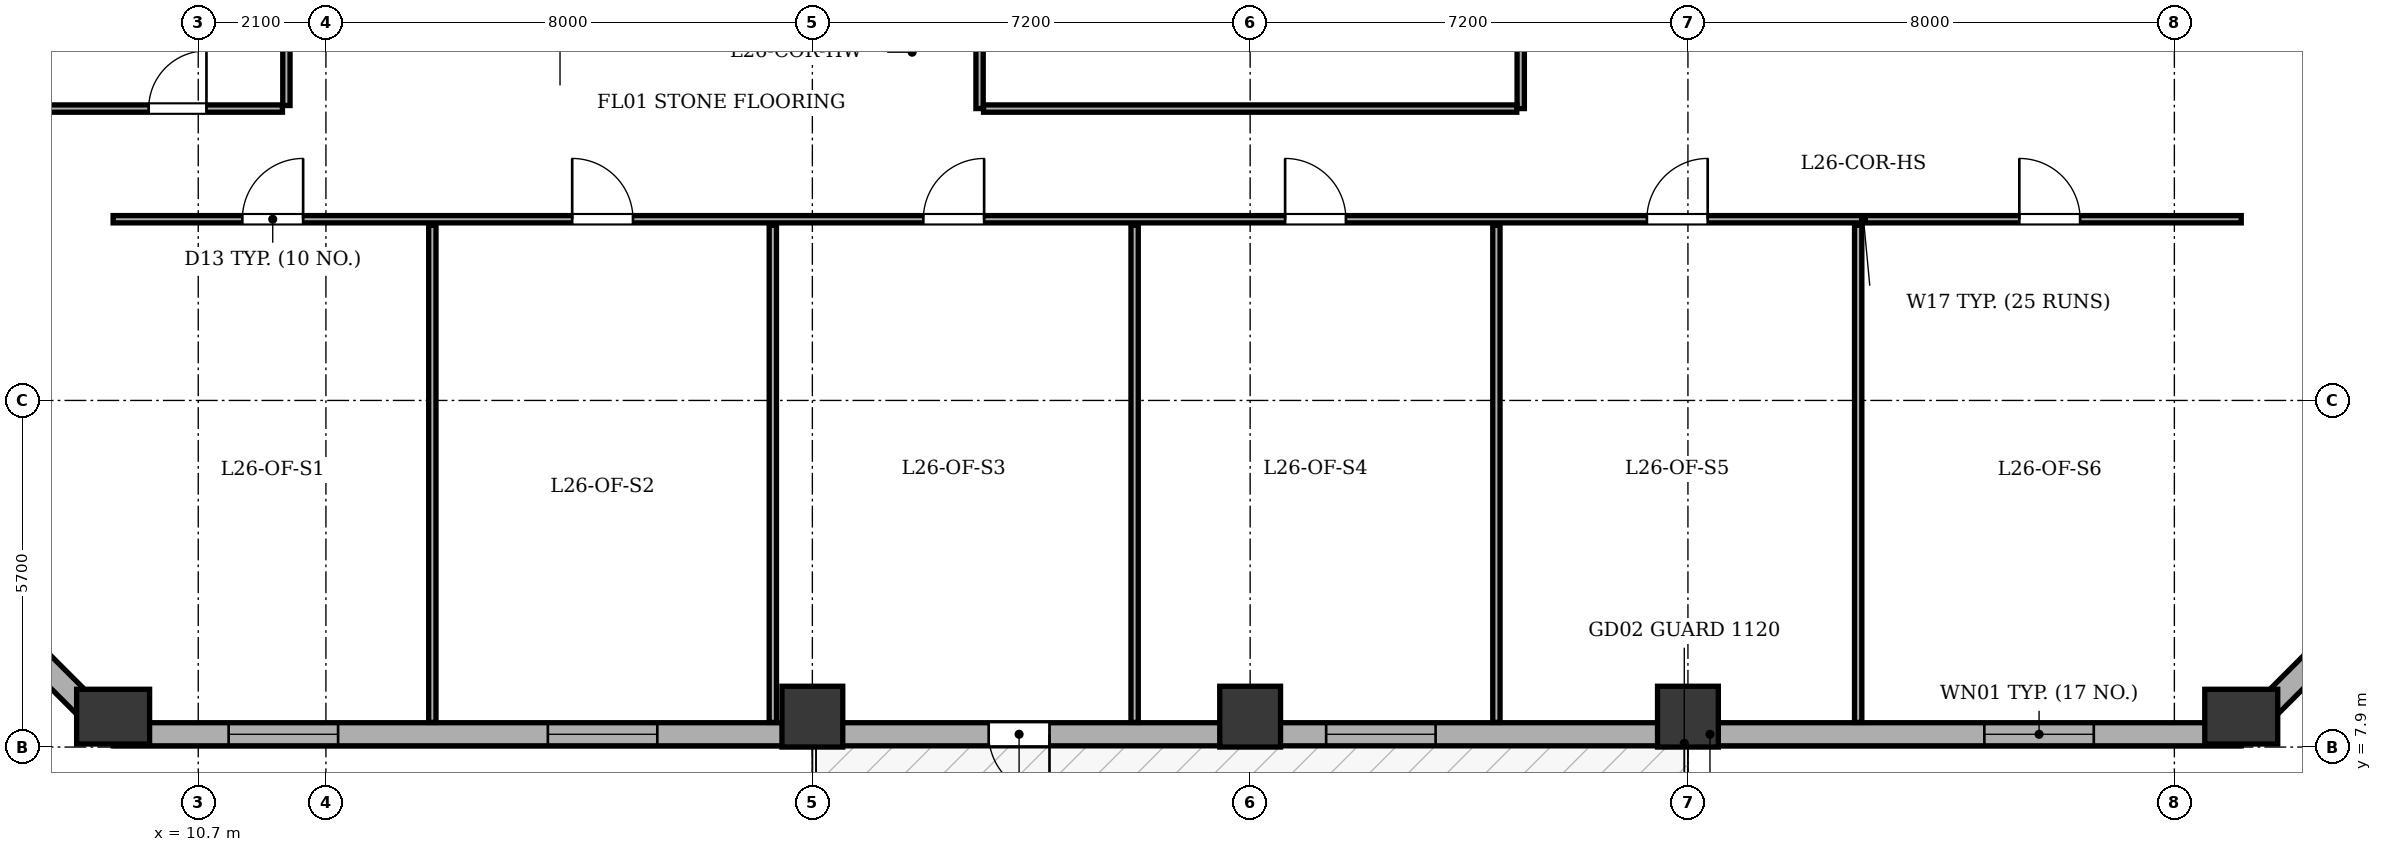
"""IFC4 building model, lengths in metres.
Left out: names, types, materials, properties, quantities, classifications, styles, units other than length and angle.
Written with IfcOpenShell. Run it as: python <this file> out.ifc"""

import sys

from ifc_helpers import new_model, si_unit, direction, frame, frame_2d, origin, origin_2d, place, context, subcontext, project, spatial, rectangle, extrude, element, fill, save


model = new_model("IFC4")
c1 = context("Model", 3, precision=1e-05, world=origin(), true_north=direction((0.0, 1.0)))
c2 = subcontext(c1, "Body", "Model", "MODEL_VIEW")
j1 = project(units=[si_unit("LENGTHUNIT", "METRE"), si_unit("PLANEANGLEUNIT", "RADIAN")], contexts=[c1])
p1 = place(None, origin())
s1 = spatial("IfcSite", under=j1, at=p1, CompositionType="ELEMENT")
p2 = place(p1, origin())
s2 = spatial("IfcBuilding", under=s1, at=p2, CompositionType="ELEMENT")
p3 = place(p2, frame((0.0, 0.0, 106.2)))
s3 = spatial("IfcBuildingStorey", under=s2, at=p3, CompositionType="ELEMENT", Elevation=106.2)
p4 = place(p3, frame((9.3, 8.4, 0.0), z_axis=(0.0, 0.0, 1.0), x_axis=(1.0, 0.0, 0.0)))
e1 = element("IfcColumn", 1, at=p4, inside=s3, PredefinedType="COLUMN", context=c2, shape_type="SweptSolid", body=[
    extrude(rectangle(XDim=0.9, YDim=1.2, at=origin_2d()), origin(), (0.0, 0.0, 1.0), 3.9),
])
for number, where, z_axis, x_axis in (
    (2, (20.8, 8.4, 0.0), (0.0, 0.0, 1.0), (1.0, 0.0, 0.0)),
    (3, (28.0, 8.4, 0.0), (0.0, 0.0, 1.0), (1.0, 0.0, 0.0)),
    (4, (35.2, 8.4, 0.0), (0.0, 0.0, 1.0), (1.0, 0.0, 0.0)),
):
    element("IfcColumn", number, at=place(p3, frame(where, z_axis=z_axis, x_axis=x_axis)), inside=s3, PredefinedType="COLUMN", context=c2, shape_type="SweptSolid", body=[
        extrude(rectangle(XDim=1.0, YDim=1.0, at=origin_2d()), origin(), (0.0, 0.0, 1.0), 3.9),
    ])
p5 = place(p3, frame((44.3, 8.4, 0.0), z_axis=(0.0, 0.0, 1.0), x_axis=(1.0, 0.0, 0.0)))
e5 = element("IfcColumn", 5, at=p5, inside=s3, PredefinedType="COLUMN", context=c2, shape_type="SweptSolid", body=[
    extrude(rectangle(XDim=0.9, YDim=1.2, at=origin_2d()), origin(), (0.0, 0.0, 1.0), 3.9),
])
p6 = place(p3, frame((44.3, 8.11, 0.0), z_axis=(0.0, 0.0, 1.0), x_axis=(-1.0, 0.0, 0.0)))
e6 = element("IfcWall", 6, at=p6, inside=s3, PredefinedType="STANDARD", context=c2, shape_type="SweptSolid", body=[
    extrude(rectangle(XDim=35.0, YDim=0.38, at=frame_2d((17.5, 0.0))), origin(), (0.0, 0.0, 1.0), 2.985),
])
p7 = place(p6, frame((19.6, 0.0, 0.0)))
e7 = element("IfcOpeningElement", 7, at=p7, cuts=e6, PredefinedType="OPENING", context=c2, shape_type="SweptSolid", body=[
    extrude(rectangle(XDim=1.0, YDim=2.02, at=frame_2d((0.5, 1.01))), frame((0.0, 0.2, 0.0), z_axis=(0.0, -1.0, 0.0), x_axis=(1.0, 0.0, 0.0)), (0.0, 0.0, 1.0), 0.4),
])
p8 = place(p6, frame((2.425, 0.0, 0.8)))
e8 = element("IfcOpeningElement", 8, at=p8, cuts=e6, PredefinedType="OPENING", context=c2, shape_type="SweptSolid", body=[
    extrude(rectangle(XDim=1.8, YDim=1.9, at=frame_2d((0.9, 0.95))), frame((0.0, 0.2, 0.0), z_axis=(0.0, -1.0, 0.0), x_axis=(1.0, 0.0, 0.0)), (0.0, 0.0, 1.0), 0.4),
])
p9 = place(p6, frame((13.25, 0.0, 0.8)))
e9 = element("IfcOpeningElement", 9, at=p9, cuts=e6, PredefinedType="OPENING", context=c2, shape_type="SweptSolid", body=[
    extrude(rectangle(XDim=1.8, YDim=1.9, at=frame_2d((0.9, 0.95))), frame((0.0, 0.2, 0.0), z_axis=(0.0, -1.0, 0.0), x_axis=(1.0, 0.0, 0.0)), (0.0, 0.0, 1.0), 0.4),
])
p10 = place(p6, frame((26.05, 0.0, 0.8)))
e10 = element("IfcOpeningElement", 10, at=p10, cuts=e6, PredefinedType="OPENING", context=c2, shape_type="SweptSolid", body=[
    extrude(rectangle(XDim=1.8, YDim=1.9, at=frame_2d((0.9, 0.95))), frame((0.0, 0.2, 0.0), z_axis=(0.0, -1.0, 0.0), x_axis=(1.0, 0.0, 0.0)), (0.0, 0.0, 1.0), 0.4),
])
p11 = place(p6, frame((31.3, 0.0, 0.8)))
e11 = element("IfcOpeningElement", 11, at=p11, cuts=e6, PredefinedType="OPENING", context=c2, shape_type="SweptSolid", body=[
    extrude(rectangle(XDim=1.8, YDim=1.9, at=frame_2d((0.9, 0.95))), frame((0.0, 0.2, 0.0), z_axis=(0.0, -1.0, 0.0), x_axis=(1.0, 0.0, 0.0)), (0.0, 0.0, 1.0), 0.4),
])
p12 = place(p3, frame((9.3, 8.11, 0.0), z_axis=(0.0, 0.0, 1.0), x_axis=(-0.707124801467, 0.707088760447, 0.0)))
e12 = element("IfcWall", 12, at=p12, inside=s3, PredefinedType="STANDARD", context=c2, shape_type="SweptSolid", body=[
    extrude(rectangle(XDim=6.774, YDim=0.38, at=frame_2d((3.387, 0.0))), origin(), (0.0, 0.0, 1.0), 2.985),
])
p13 = place(p12, frame((2.687, 0.0, 0.8)))
e13 = element("IfcOpeningElement", 13, at=p13, cuts=e12, PredefinedType="OPENING", context=c2, shape_type="SweptSolid", body=[
    extrude(rectangle(XDim=1.4, YDim=1.65, at=frame_2d((0.7, 0.825))), frame((0.0, 0.2, 0.0), z_axis=(0.0, -1.0, 0.0), x_axis=(1.0, 0.0, 0.0)), (0.0, 0.0, 1.0), 0.4),
])
p14 = place(p3, frame((49.09, 12.9, 0.0), z_axis=(0.0, 0.0, 1.0), x_axis=(-0.707124801467, -0.707088760447, 0.0)))
e14 = element("IfcWall", 14, at=p14, inside=s3, PredefinedType="STANDARD", context=c2, shape_type="SweptSolid", body=[
    extrude(rectangle(XDim=6.774, YDim=0.38, at=frame_2d((3.387, 0.0))), origin(), (0.0, 0.0, 1.0), 2.985),
])
p15 = place(p14, frame((2.687, 0.0, 0.8)))
e15 = element("IfcOpeningElement", 15, at=p15, cuts=e14, PredefinedType="OPENING", context=c2, shape_type="SweptSolid", body=[
    extrude(rectangle(XDim=1.4, YDim=1.65, at=frame_2d((0.7, 0.825))), frame((0.0, 0.2, 0.0), z_axis=(0.0, -1.0, 0.0), x_axis=(1.0, 0.0, 0.0)), (0.0, 0.0, 1.0), 0.4),
])
for number, where, z_axis, x_axis in (
    (16, (23.55, 18.4, 0.0), (0.0, 0.0, 1.0), (0.0, 1.0, 0.0)),
    (17, (32.45, 18.4, 0.0), (0.0, 0.0, 1.0), (0.0, 1.0, 0.0)),
):
    element("IfcWall", number, at=place(p3, frame(where, z_axis=z_axis, x_axis=x_axis)), inside=s3, PredefinedType="PARTITIONING", context=c2, shape_type="SweptSolid", body=[
        extrude(rectangle(XDim=3.485, YDim=0.12, at=frame_2d((1.743, 0.0))), origin(), (0.0, 0.0, 1.0), 3.45),
    ])
p16 = place(p3, frame((23.615, 18.4, 0.0), z_axis=(0.0, 0.0, 1.0), x_axis=(1.0, 0.0, 0.0)))
e18 = element("IfcWall", 18, at=p16, inside=s3, PredefinedType="PARTITIONING", context=c2, shape_type="SweptSolid", body=[
    extrude(rectangle(XDim=8.77, YDim=0.12, at=frame_2d((4.385, 0.0))), origin(), (0.0, 0.0, 1.0), 3.45),
])
p17 = place(p3, frame((9.3, 16.58, 0.0), z_axis=(0.0, 0.0, 1.0), x_axis=(1.0, 0.0, 0.0)))
e19 = element("IfcWall", 19, at=p17, inside=s3, PredefinedType="PARTITIONING", context=c2, shape_type="SweptSolid", body=[
    extrude(rectangle(XDim=35.0, YDim=0.12, at=frame_2d((17.5, 0.0))), origin(), (0.0, 0.0, 1.0), 3.45),
])
p18 = place(p17, frame((2.125, 0.0, 0.0)))
e20 = element("IfcOpeningElement", 20, at=p18, cuts=e19, PredefinedType="OPENING", context=c2, shape_type="SweptSolid", body=[
    extrude(rectangle(XDim=1.0, YDim=2.1, at=frame_2d((0.5, 1.05))), frame((0.0, 0.07, 0.0), z_axis=(0.0, -1.0, 0.0), x_axis=(1.0, 0.0, 0.0)), (0.0, 0.0, 1.0), 0.14),
])
p19 = place(p17, frame((7.55, 0.0, 0.0)))
e21 = element("IfcOpeningElement", 21, at=p19, cuts=e19, PredefinedType="OPENING", context=c2, shape_type="SweptSolid", body=[
    extrude(rectangle(XDim=1.0, YDim=2.1, at=frame_2d((0.5, 1.05))), frame((0.0, 0.07, 0.0), z_axis=(0.0, -1.0, 0.0), x_axis=(1.0, 0.0, 0.0)), (0.0, 0.0, 1.0), 0.14),
])
p20 = place(p17, frame((13.325, 0.0, 0.0)))
e22 = element("IfcOpeningElement", 22, at=p20, cuts=e19, PredefinedType="OPENING", context=c2, shape_type="SweptSolid", body=[
    extrude(rectangle(XDim=1.0, YDim=2.1, at=frame_2d((0.5, 1.05))), frame((0.0, 0.07, 0.0), z_axis=(0.0, -1.0, 0.0), x_axis=(1.0, 0.0, 0.0)), (0.0, 0.0, 1.0), 0.14),
])
p21 = place(p17, frame((19.275, 0.0, 0.0)))
e23 = element("IfcOpeningElement", 23, at=p21, cuts=e19, PredefinedType="OPENING", context=c2, shape_type="SweptSolid", body=[
    extrude(rectangle(XDim=1.0, YDim=2.1, at=frame_2d((0.5, 1.05))), frame((0.0, 0.07, 0.0), z_axis=(0.0, -1.0, 0.0), x_axis=(1.0, 0.0, 0.0)), (0.0, 0.0, 1.0), 0.14),
])
p22 = place(p17, frame((25.225, 0.0, 0.0)))
e24 = element("IfcOpeningElement", 24, at=p22, cuts=e19, PredefinedType="OPENING", context=c2, shape_type="SweptSolid", body=[
    extrude(rectangle(XDim=1.0, YDim=2.1, at=frame_2d((0.5, 1.05))), frame((0.0, 0.07, 0.0), z_axis=(0.0, -1.0, 0.0), x_axis=(1.0, 0.0, 0.0)), (0.0, 0.0, 1.0), 0.14),
])
p23 = place(p17, frame((31.35, 0.0, 0.0)))
e25 = element("IfcOpeningElement", 25, at=p23, cuts=e19, PredefinedType="OPENING", context=c2, shape_type="SweptSolid", body=[
    extrude(rectangle(XDim=1.0, YDim=2.1, at=frame_2d((0.5, 1.05))), frame((0.0, 0.07, 0.0), z_axis=(0.0, -1.0, 0.0), x_axis=(1.0, 0.0, 0.0)), (0.0, 0.0, 1.0), 0.14),
])
for number, where, z_axis, x_axis in (
    (26, (14.55, 8.305, 0.0), (0.0, 0.0, 1.0), (0.0, 1.0, 0.0)),
    (27, (20.15, 8.305, 0.0), (0.0, 0.0, 1.0), (0.0, 1.0, 0.0)),
):
    element("IfcWall", number, at=place(p3, frame(where, z_axis=z_axis, x_axis=x_axis)), inside=s3, PredefinedType="PARTITIONING", context=c2, shape_type="SweptSolid", body=[
        extrude(rectangle(XDim=8.175, YDim=0.12, at=frame_2d((4.087, 0.0))), origin(), (0.0, 0.0, 1.0), 3.45),
    ])
p24 = place(p3, frame((26.1, 8.305, 0.0), z_axis=(0.0, 0.0, 1.0), x_axis=(0.0, 1.0, 0.0)))
e28 = element("IfcWall", 28, at=p24, inside=s3, PredefinedType="PARTITIONING", context=c2, shape_type="SweptSolid", body=[
    extrude(rectangle(XDim=8.175, YDim=0.12, at=frame_2d((4.087, 0.0))), origin(), (0.0, 0.0, 1.0), 2.985),
])
for number, where, z_axis, x_axis in (
    (29, (32.05, 8.305, 0.0), (0.0, 0.0, 1.0), (0.0, 1.0, 0.0)),
    (30, (38.0, 8.305, 0.0), (0.0, 0.0, 1.0), (0.0, 1.0, 0.0)),
):
    element("IfcWall", number, at=place(p3, frame(where, z_axis=z_axis, x_axis=x_axis)), inside=s3, PredefinedType="PARTITIONING", context=c2, shape_type="SweptSolid", body=[
        extrude(rectangle(XDim=8.175, YDim=0.12, at=frame_2d((4.087, 0.0))), origin(), (0.0, 0.0, 1.0), 3.45),
    ])
p25 = place(p3, frame((12.15, 18.45, 0.0), z_axis=(0.0, 0.0, 1.0), x_axis=(0.0, 1.0, 0.0)))
e31 = element("IfcWall", 31, at=p25, inside=s3, PredefinedType="PARTITIONING", context=c2, shape_type="SweptSolid", body=[
    extrude(rectangle(XDim=17.5, YDim=0.12, at=frame_2d((8.75, 0.0))), origin(), (0.0, 0.0, 1.0), 3.45),
])
p26 = place(p3, frame((4.705, 18.4, 0.0), z_axis=(0.0, 0.0, 1.0), x_axis=(1.0, 0.0, 0.0)))
e32 = element("IfcWall", 32, at=p26, inside=s3, PredefinedType="PARTITIONING", context=c2, shape_type="SweptSolid", body=[
    extrude(rectangle(XDim=7.38, YDim=0.12, at=frame_2d((3.69, 0.0))), origin(), (0.0, 0.0, 1.0), 3.45),
])
p27 = place(p26, frame((5.18, 0.0, 0.0)))
e33 = element("IfcOpeningElement", 33, at=p27, cuts=e32, PredefinedType="OPENING", context=c2, shape_type="SweptSolid", body=[
    extrude(rectangle(XDim=0.95, YDim=2.1, at=frame_2d((0.475, 1.05))), frame((0.0, 0.07, 0.0), z_axis=(0.0, -1.0, 0.0), x_axis=(1.0, 0.0, 0.0)), (0.0, 0.0, 1.0), 0.14),
])
p28 = place(p7, origin())
e34 = element("IfcDoor", 34, at=p28, inside=s3, OperationType="SINGLE_SWING_LEFT", PredefinedType="DOOR", context=c2, shape_type="SweptSolid", body=[
    extrude(rectangle(XDim=1.0, YDim=2.02, at=frame_2d((0.5, 1.01))), frame((0.0, 0.025, 0.0), z_axis=(0.0, -1.0, 0.0), x_axis=(1.0, 0.0, 0.0)), (0.0, 0.0, 1.0), 0.05),
])
fill(e7, e34)
p29 = place(p8, origin())
e35 = element("IfcWindow", 35, at=p29, inside=s3, PartitioningType="SINGLE_PANEL", PredefinedType="WINDOW", context=c2, shape_type="SweptSolid", body=[
    extrude(rectangle(XDim=1.8, YDim=1.9, at=frame_2d((0.9, 0.95))), frame((0.0, -0.01, 0.0), z_axis=(0.0, -1.0, 0.0), x_axis=(1.0, 0.0, 0.0)), (0.0, 0.0, 1.0), 0.06),
])
fill(e8, e35)
p30 = place(p9, origin())
e36 = element("IfcWindow", 36, at=p30, inside=s3, PartitioningType="SINGLE_PANEL", PredefinedType="WINDOW", context=c2, shape_type="SweptSolid", body=[
    extrude(rectangle(XDim=1.8, YDim=1.9, at=frame_2d((0.9, 0.95))), frame((0.0, -0.01, 0.0), z_axis=(0.0, -1.0, 0.0), x_axis=(1.0, 0.0, 0.0)), (0.0, 0.0, 1.0), 0.06),
])
fill(e9, e36)
p31 = place(p10, origin())
e37 = element("IfcWindow", 37, at=p31, inside=s3, PartitioningType="SINGLE_PANEL", PredefinedType="WINDOW", context=c2, shape_type="SweptSolid", body=[
    extrude(rectangle(XDim=1.8, YDim=1.9, at=frame_2d((0.9, 0.95))), frame((0.0, -0.01, 0.0), z_axis=(0.0, -1.0, 0.0), x_axis=(1.0, 0.0, 0.0)), (0.0, 0.0, 1.0), 0.06),
])
fill(e10, e37)
p32 = place(p11, origin())
e38 = element("IfcWindow", 38, at=p32, inside=s3, PartitioningType="SINGLE_PANEL", PredefinedType="WINDOW", context=c2, shape_type="SweptSolid", body=[
    extrude(rectangle(XDim=1.8, YDim=1.9, at=frame_2d((0.9, 0.95))), frame((0.0, -0.01, 0.0), z_axis=(0.0, -1.0, 0.0), x_axis=(1.0, 0.0, 0.0)), (0.0, 0.0, 1.0), 0.06),
])
fill(e11, e38)
p33 = place(p18, origin())
e39 = element("IfcDoor", 39, at=p33, inside=s3, OperationType="SINGLE_SWING_RIGHT", PredefinedType="DOOR", context=c2, shape_type="SweptSolid", body=[
    extrude(rectangle(XDim=1.0, YDim=2.1, at=frame_2d((0.5, 1.05))), frame((0.0, 0.025, 0.0), z_axis=(0.0, -1.0, 0.0), x_axis=(1.0, 0.0, 0.0)), (0.0, 0.0, 1.0), 0.05),
])
fill(e20, e39)
p34 = place(p19, origin())
e40 = element("IfcDoor", 40, at=p34, inside=s3, OperationType="SINGLE_SWING_LEFT", PredefinedType="DOOR", context=c2, shape_type="SweptSolid", body=[
    extrude(rectangle(XDim=1.0, YDim=2.1, at=frame_2d((0.5, 1.05))), frame((0.0, 0.025, 0.0), z_axis=(0.0, -1.0, 0.0), x_axis=(1.0, 0.0, 0.0)), (0.0, 0.0, 1.0), 0.05),
])
fill(e21, e40)
p35 = place(p20, origin())
e41 = element("IfcDoor", 41, at=p35, inside=s3, OperationType="SINGLE_SWING_RIGHT", PredefinedType="DOOR", context=c2, shape_type="SweptSolid", body=[
    extrude(rectangle(XDim=1.0, YDim=2.1, at=frame_2d((0.5, 1.05))), frame((0.0, 0.025, 0.0), z_axis=(0.0, -1.0, 0.0), x_axis=(1.0, 0.0, 0.0)), (0.0, 0.0, 1.0), 0.05),
])
fill(e22, e41)
p36 = place(p21, origin())
e42 = element("IfcDoor", 42, at=p36, inside=s3, OperationType="SINGLE_SWING_LEFT", PredefinedType="DOOR", context=c2, shape_type="SweptSolid", body=[
    extrude(rectangle(XDim=1.0, YDim=2.1, at=frame_2d((0.5, 1.05))), frame((0.0, 0.025, 0.0), z_axis=(0.0, -1.0, 0.0), x_axis=(1.0, 0.0, 0.0)), (0.0, 0.0, 1.0), 0.05),
])
fill(e23, e42)
p37 = place(p22, origin())
e43 = element("IfcDoor", 43, at=p37, inside=s3, OperationType="SINGLE_SWING_RIGHT", PredefinedType="DOOR", context=c2, shape_type="SweptSolid", body=[
    extrude(rectangle(XDim=1.0, YDim=2.1, at=frame_2d((0.5, 1.05))), frame((0.0, 0.025, 0.0), z_axis=(0.0, -1.0, 0.0), x_axis=(1.0, 0.0, 0.0)), (0.0, 0.0, 1.0), 0.05),
])
fill(e24, e43)
p38 = place(p23, origin())
e44 = element("IfcDoor", 44, at=p38, inside=s3, OperationType="SINGLE_SWING_LEFT", PredefinedType="DOOR", context=c2, shape_type="SweptSolid", body=[
    extrude(rectangle(XDim=1.0, YDim=2.1, at=frame_2d((0.5, 1.05))), frame((0.0, 0.025, 0.0), z_axis=(0.0, -1.0, 0.0), x_axis=(1.0, 0.0, 0.0)), (0.0, 0.0, 1.0), 0.05),
])
fill(e25, e44)
p39 = place(p27, origin())
e45 = element("IfcDoor", 45, at=p39, inside=s3, OperationType="SINGLE_SWING_RIGHT", PredefinedType="DOOR", context=c2, shape_type="SweptSolid", body=[
    extrude(rectangle(XDim=0.95, YDim=2.1, at=frame_2d((0.475, 1.05))), frame((0.0, 0.025, 0.0), z_axis=(0.0, -1.0, 0.0), x_axis=(1.0, 0.0, 0.0)), (0.0, 0.0, 1.0), 0.05),
])
fill(e33, e45)
save(model, sys.argv[1])
